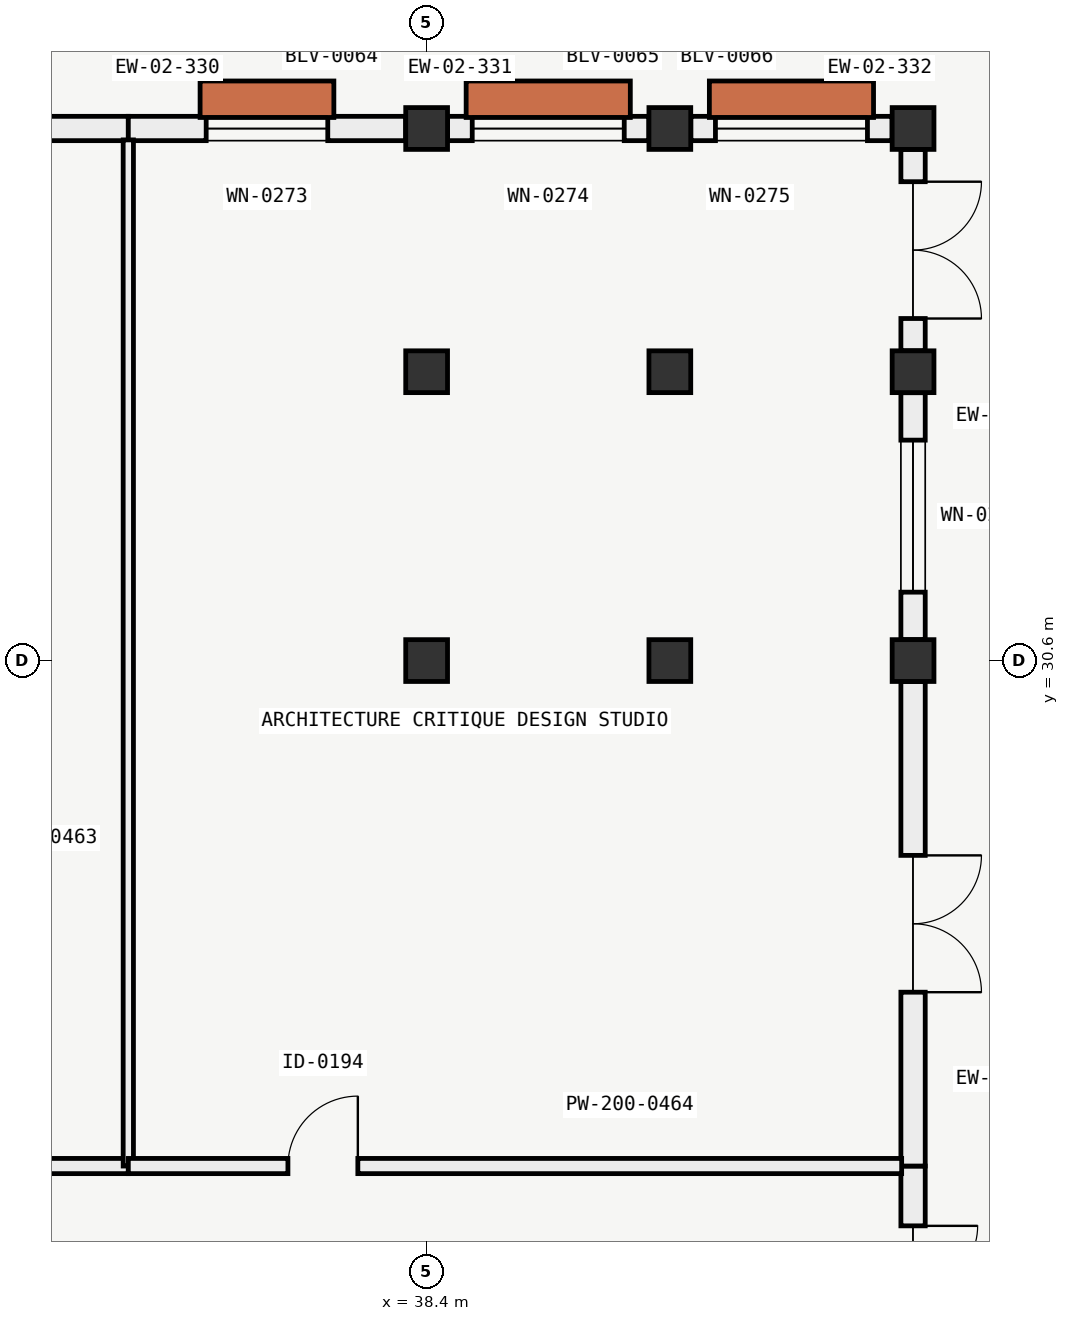
"""IFC4 building model, lengths in metres.
Left out: names, types, materials, properties, quantities, classifications, styles, units other than length and angle.
Written with IfcOpenShell. Run it as: python <this file> out.ifc"""

import sys

from ifc_helpers import new_model, si_unit, direction, frame, frame_2d, origin, origin_2d, place, context, subcontext, project, spatial, rectangle, extrude, element, fill, save


model = new_model("IFC4")
c1 = context("Model", 3, precision=1e-05, world=origin(), true_north=direction((0.0, 1.0)))
c2 = subcontext(c1, "Body", "Model", "MODEL_VIEW")
j1 = project(units=[si_unit("LENGTHUNIT", "METRE"), si_unit("PLANEANGLEUNIT", "RADIAN")], contexts=[c1])
p1 = place(None, origin())
s1 = spatial("IfcSite", under=j1, at=p1, CompositionType="ELEMENT")
p2 = place(p1, origin())
s2 = spatial("IfcBuilding", under=s1, at=p2, CompositionType="ELEMENT")
p3 = place(p2, frame((0.0, 0.0, 22.2)))
s3 = spatial("IfcBuildingStorey", under=s2, at=p3, CompositionType="ELEMENT", Elevation=22.2)
for number, where, z_axis, x_axis in (
    (1, (38.4, 30.6, 0.0), (0.0, 0.0, 1.0), (1.0, 0.0, 0.0)),
    (2, (38.4, 34.4, 0.0), (0.0, 0.0, 1.0), (1.0, 0.0, 0.0)),
    (3, (38.4, 37.6, 0.0), (0.0, 0.0, 1.0), (1.0, 0.0, 0.0)),
    (4, (41.6, 30.6, 0.0), (0.0, 0.0, 1.0), (1.0, 0.0, 0.0)),
    (5, (41.6, 34.4, 0.0), (0.0, 0.0, 1.0), (1.0, 0.0, 0.0)),
    (6, (41.6, 37.6, 0.0), (0.0, 0.0, 1.0), (1.0, 0.0, 0.0)),
    (7, (44.8, 30.6, 0.0), (0.0, 0.0, 1.0), (1.0, 0.0, 0.0)),
    (8, (44.8, 34.4, 0.0), (0.0, 0.0, 1.0), (1.0, 0.0, 0.0)),
    (9, (44.8, 37.6, 0.0), (0.0, 0.0, 1.0), (1.0, 0.0, 0.0)),
):
    element("IfcColumn", number, at=place(p3, frame(where, z_axis=z_axis, x_axis=x_axis)), inside=s3, PredefinedType="COLUMN", context=c2, shape_type="SweptSolid", body=[
        extrude(rectangle(XDim=0.55, YDim=0.55, at=origin_2d()), origin(), (0.0, 0.0, 1.0), 4.2),
    ])
p4 = place(p3, frame((44.8, 23.95, 0.0), z_axis=(0.0, 0.0, 1.0), x_axis=(0.0, -1.0, 0.0)))
e10 = element("IfcWall", 10, at=p4, inside=s3, PredefinedType="SOLIDWALL", context=c2, shape_type="SweptSolid", body=[
    extrude(rectangle(XDim=3.274, YDim=0.32, at=frame_2d((1.637, 0.0))), origin(), (0.0, 0.0, 1.0), 3.3),
])
p5 = place(p4, frame((0.787, 0.0, 0.0)))
e11 = element("IfcOpeningElement", 11, at=p5, cuts=e10, PredefinedType="OPENING", context=c2, shape_type="SweptSolid", body=[
    extrude(rectangle(XDim=1.7, YDim=2.15, at=frame_2d((0.85, 1.075))), frame((0.0, 0.17, 0.0), z_axis=(0.0, -1.0, 0.0), x_axis=(1.0, 0.0, 0.0)), (0.0, 0.0, 1.0), 0.34),
])
p6 = place(p3, frame((44.8, 30.324, 0.0), z_axis=(0.0, 0.0, 1.0), x_axis=(0.0, -1.0, 0.0)))
e12 = element("IfcWall", 12, at=p6, inside=s3, PredefinedType="SOLIDWALL", context=c2, shape_type="SweptSolid", body=[
    extrude(rectangle(XDim=6.374, YDim=0.32, at=frame_2d((3.187, 0.0))), origin(), (0.0, 0.0, 1.0), 3.3),
])
p7 = place(p6, frame((2.287, 0.0, 0.0)))
e13 = element("IfcOpeningElement", 13, at=p7, cuts=e12, PredefinedType="OPENING", context=c2, shape_type="SweptSolid", body=[
    extrude(rectangle(XDim=1.8, YDim=2.2, at=frame_2d((0.9, 1.1))), frame((0.0, 0.17, 0.0), z_axis=(0.0, -1.0, 0.0), x_axis=(1.0, 0.0, 0.0)), (0.0, 0.0, 1.0), 0.34),
])
p8 = place(p3, frame((44.8, 37.324, 0.0), z_axis=(0.0, 0.0, 1.0), x_axis=(0.0, -1.0, 0.0)))
e14 = element("IfcWall", 14, at=p8, inside=s3, PredefinedType="SOLIDWALL", context=c2, shape_type="SweptSolid", body=[
    extrude(rectangle(XDim=2.648, YDim=0.32, at=frame_2d((1.324, 0.0))), origin(), (0.0, 0.0, 1.0), 3.3),
])
p9 = place(p8, frame((0.424, 0.0, 0.0)))
e15 = element("IfcOpeningElement", 15, at=p9, cuts=e14, PredefinedType="OPENING", context=c2, shape_type="SweptSolid", body=[
    extrude(rectangle(XDim=1.8, YDim=2.2, at=frame_2d((0.9, 1.1))), frame((0.0, 0.17, 0.0), z_axis=(0.0, -1.0, 0.0), x_axis=(1.0, 0.0, 0.0)), (0.0, 0.0, 1.0), 0.34),
])
p10 = place(p3, frame((44.8, 34.124, 0.0), z_axis=(0.0, 0.0, 1.0), x_axis=(0.0, -1.0, 0.0)))
e16 = element("IfcWall", 16, at=p10, inside=s3, PredefinedType="SOLIDWALL", context=c2, shape_type="SweptSolid", body=[
    extrude(rectangle(XDim=3.248, YDim=0.32, at=frame_2d((1.624, 0.0))), origin(), (0.0, 0.0, 1.0), 3.3),
])
p11 = place(p10, frame((0.624, 0.0, 0.8)))
e17 = element("IfcOpeningElement", 17, at=p11, cuts=e16, PredefinedType="OPENING", context=c2, shape_type="SweptSolid", body=[
    extrude(rectangle(XDim=2.0, YDim=1.35, at=frame_2d((1.0, 0.675))), frame((0.0, 0.17, 0.0), z_axis=(0.0, -1.0, 0.0), x_axis=(1.0, 0.0, 0.0)), (0.0, 0.0, 1.0), 0.34),
])
p12 = place(p3, frame((29.076, 37.6, 0.0), z_axis=(0.0, 0.0, 1.0), x_axis=(1.0, 0.0, 0.0)))
e18 = element("IfcWall", 18, at=p12, inside=s3, PredefinedType="SOLIDWALL", context=c2, shape_type="SweptSolid", body=[
    extrude(rectangle(XDim=5.399, YDim=0.32, at=frame_2d((2.7, 0.0))), origin(), (0.0, 0.0, 1.0), 3.3),
])
p13 = place(p12, frame((1.8, 0.0, 0.0)))
e19 = element("IfcOpeningElement", 19, at=p13, cuts=e18, PredefinedType="OPENING", context=c2, shape_type="SweptSolid", body=[
    extrude(rectangle(XDim=1.8, YDim=2.2, at=frame_2d((0.9, 1.1))), frame((0.0, 0.17, 0.0), z_axis=(0.0, -1.0, 0.0), x_axis=(1.0, 0.0, 0.0)), (0.0, 0.0, 1.0), 0.34),
])
p14 = place(p3, frame((34.475, 37.6, 0.0), z_axis=(0.0, 0.0, 1.0), x_axis=(1.0, 0.0, 0.0)))
e20 = element("IfcWall", 20, at=p14, inside=s3, PredefinedType="SOLIDWALL", context=c2, shape_type="SweptSolid", body=[
    extrude(rectangle(XDim=3.649, YDim=0.32, at=frame_2d((1.824, 0.0))), origin(), (0.0, 0.0, 1.0), 3.3),
])
p15 = place(p14, frame((1.024, 0.0, 0.85)))
e21 = element("IfcOpeningElement", 21, at=p15, cuts=e20, PredefinedType="OPENING", context=c2, shape_type="SweptSolid", body=[
    extrude(rectangle(XDim=1.6, YDim=1.9, at=frame_2d((0.8, 0.95))), frame((0.0, 0.17, 0.0), z_axis=(0.0, -1.0, 0.0), x_axis=(1.0, 0.0, 0.0)), (0.0, 0.0, 1.0), 0.34),
])
p16 = place(p3, frame((38.676, 37.6, 0.0), z_axis=(0.0, 0.0, 1.0), x_axis=(1.0, 0.0, 0.0)))
e22 = element("IfcWall", 22, at=p16, inside=s3, PredefinedType="SOLIDWALL", context=c2, shape_type="SweptSolid", body=[
    extrude(rectangle(XDim=2.648, YDim=0.32, at=frame_2d((1.324, 0.0))), origin(), (0.0, 0.0, 1.0), 3.3),
])
p17 = place(p16, frame((0.324, 0.0, 0.85)))
e23 = element("IfcOpeningElement", 23, at=p17, cuts=e22, PredefinedType="OPENING", context=c2, shape_type="SweptSolid", body=[
    extrude(rectangle(XDim=2.0, YDim=1.35, at=frame_2d((1.0, 0.675))), frame((0.0, 0.17, 0.0), z_axis=(0.0, -1.0, 0.0), x_axis=(1.0, 0.0, 0.0)), (0.0, 0.0, 1.0), 0.34),
])
p18 = place(p3, frame((41.876, 37.6, 0.0), z_axis=(0.0, 0.0, 1.0), x_axis=(1.0, 0.0, 0.0)))
e24 = element("IfcWall", 24, at=p18, inside=s3, PredefinedType="SOLIDWALL", context=c2, shape_type="SweptSolid", body=[
    extrude(rectangle(XDim=2.648, YDim=0.32, at=frame_2d((1.324, 0.0))), origin(), (0.0, 0.0, 1.0), 3.3),
])
p19 = place(p18, frame((0.324, 0.0, 0.85)))
e25 = element("IfcOpeningElement", 25, at=p19, cuts=e24, PredefinedType="OPENING", context=c2, shape_type="SweptSolid", body=[
    extrude(rectangle(XDim=2.0, YDim=1.35, at=frame_2d((1.0, 0.675))), frame((0.0, 0.17, 0.0), z_axis=(0.0, -1.0, 0.0), x_axis=(1.0, 0.0, 0.0)), (0.0, 0.0, 1.0), 0.34),
])
p20 = place(p3, frame((27.325, 23.95, 0.0), z_axis=(0.0, 0.0, 1.0), x_axis=(1.0, 0.0, 0.0)))
e26 = element("IfcWall", 26, at=p20, inside=s3, PredefinedType="PARTITIONING", context=c2, shape_type="SweptSolid", body=[
    extrude(rectangle(XDim=7.15, YDim=0.2, at=frame_2d((3.575, 0.0))), origin(), (0.0, 0.0, 1.0), 3.305),
])
p21 = place(p20, frame((4.1, 0.0, 0.0)))
e27 = element("IfcOpeningElement", 27, at=p21, cuts=e26, PredefinedType="OPENING", context=c2, shape_type="SweptSolid", body=[
    extrude(rectangle(XDim=1.6, YDim=2.25, at=frame_2d((0.8, 1.125))), frame((0.0, 0.11, 0.0), z_axis=(0.0, -1.0, 0.0), x_axis=(1.0, 0.0, 0.0)), (0.0, 0.0, 1.0), 0.22),
])
p22 = place(p3, frame((34.475, 23.95, 0.0), z_axis=(0.0, 0.0, 1.0), x_axis=(0.0, 1.0, 0.0)))
e28 = element("IfcWall", 28, at=p22, inside=s3, PredefinedType="PARTITIONING", context=c2, shape_type="SweptSolid", body=[
    extrude(rectangle(XDim=13.5, YDim=0.135, at=frame_2d((6.75, 0.0))), origin(), (0.0, 0.0, 1.0), 3.405),
])
p23 = place(p3, frame((34.475, 23.95, 0.0), z_axis=(0.0, 0.0, 1.0), x_axis=(1.0, 0.0, 0.0)))
e29 = element("IfcWall", 29, at=p23, inside=s3, PredefinedType="PARTITIONING", context=c2, shape_type="SweptSolid", body=[
    extrude(rectangle(XDim=10.175, YDim=0.2, at=frame_2d((5.087, 0.0))), origin(), (0.0, 0.0, 1.0), 3.305),
])
p24 = place(p23, frame((2.1, 0.0, 0.0)))
e30 = element("IfcOpeningElement", 30, at=p24, cuts=e29, PredefinedType="OPENING", context=c2, shape_type="SweptSolid", body=[
    extrude(rectangle(XDim=0.92, YDim=2.1, at=frame_2d((0.46, 1.05))), frame((0.0, 0.11, 0.0), z_axis=(0.0, -1.0, 0.0), x_axis=(1.0, 0.0, 0.0)), (0.0, 0.0, 1.0), 0.22),
])
p25 = place(p5, origin())
e31 = element("IfcDoor", 31, at=p25, inside=s3, OperationType="DOUBLE_DOOR_SINGLE_SWING", PredefinedType="DOOR", context=c2, shape_type="SweptSolid", body=[
    extrude(rectangle(XDim=1.7, YDim=2.15, at=frame_2d((0.85, 1.075))), frame((0.0, 0.025, 0.0), z_axis=(0.0, -1.0, 0.0), x_axis=(1.0, 0.0, 0.0)), (0.0, 0.0, 1.0), 0.05),
])
fill(e11, e31)
p26 = place(p7, origin())
e32 = element("IfcDoor", 32, at=p26, inside=s3, OperationType="DOUBLE_DOOR_SINGLE_SWING", PredefinedType="DOOR", context=c2, shape_type="SweptSolid", body=[
    extrude(rectangle(XDim=1.8, YDim=2.2, at=frame_2d((0.9, 1.1))), frame((0.0, 0.025, 0.0), z_axis=(0.0, -1.0, 0.0), x_axis=(1.0, 0.0, 0.0)), (0.0, 0.0, 1.0), 0.05),
])
fill(e13, e32)
p27 = place(p9, origin())
e33 = element("IfcDoor", 33, at=p27, inside=s3, OperationType="DOUBLE_DOOR_SINGLE_SWING", PredefinedType="DOOR", context=c2, shape_type="SweptSolid", body=[
    extrude(rectangle(XDim=1.8, YDim=2.2, at=frame_2d((0.9, 1.1))), frame((0.0, 0.025, 0.0), z_axis=(0.0, -1.0, 0.0), x_axis=(1.0, 0.0, 0.0)), (0.0, 0.0, 1.0), 0.05),
])
fill(e15, e33)
p28 = place(p11, origin())
e34 = element("IfcWindow", 34, at=p28, inside=s3, PartitioningType="SINGLE_PANEL", PredefinedType="WINDOW", context=c2, shape_type="SweptSolid", body=[
    extrude(rectangle(XDim=2.0, YDim=1.35, at=frame_2d((1.0, 0.675))), frame((0.0, 0.03, 0.0), z_axis=(0.0, -1.0, 0.0), x_axis=(1.0, 0.0, 0.0)), (0.0, 0.0, 1.0), 0.06),
])
fill(e17, e34)
p29 = place(p15, origin())
e35 = element("IfcWindow", 35, at=p29, inside=s3, PartitioningType="SINGLE_PANEL", PredefinedType="WINDOW", context=c2, shape_type="SweptSolid", body=[
    extrude(rectangle(XDim=1.6, YDim=1.9, at=frame_2d((0.8, 0.95))), frame((0.0, 0.03, 0.0), z_axis=(0.0, -1.0, 0.0), x_axis=(1.0, 0.0, 0.0)), (0.0, 0.0, 1.0), 0.06),
])
fill(e21, e35)
p30 = place(p17, origin())
e36 = element("IfcWindow", 36, at=p30, inside=s3, PartitioningType="SINGLE_PANEL", PredefinedType="WINDOW", context=c2, shape_type="SweptSolid", body=[
    extrude(rectangle(XDim=2.0, YDim=1.35, at=frame_2d((1.0, 0.675))), frame((0.0, 0.03, 0.0), z_axis=(0.0, -1.0, 0.0), x_axis=(1.0, 0.0, 0.0)), (0.0, 0.0, 1.0), 0.06),
])
fill(e23, e36)
p31 = place(p19, origin())
e37 = element("IfcWindow", 37, at=p31, inside=s3, PartitioningType="SINGLE_PANEL", PredefinedType="WINDOW", context=c2, shape_type="SweptSolid", body=[
    extrude(rectangle(XDim=2.0, YDim=1.35, at=frame_2d((1.0, 0.675))), frame((0.0, 0.03, 0.0), z_axis=(0.0, -1.0, 0.0), x_axis=(1.0, 0.0, 0.0)), (0.0, 0.0, 1.0), 0.06),
])
fill(e25, e37)
p32 = place(p24, origin())
e38 = element("IfcDoor", 38, at=p32, inside=s3, OperationType="SINGLE_SWING_RIGHT", PredefinedType="DOOR", context=c2, shape_type="SweptSolid", body=[
    extrude(rectangle(XDim=0.92, YDim=2.1, at=frame_2d((0.46, 1.05))), frame((0.0, 0.025, 0.0), z_axis=(0.0, -1.0, 0.0), x_axis=(1.0, 0.0, 0.0)), (0.0, 0.0, 1.0), 0.05),
])
fill(e30, e38)
save(model, sys.argv[1])
